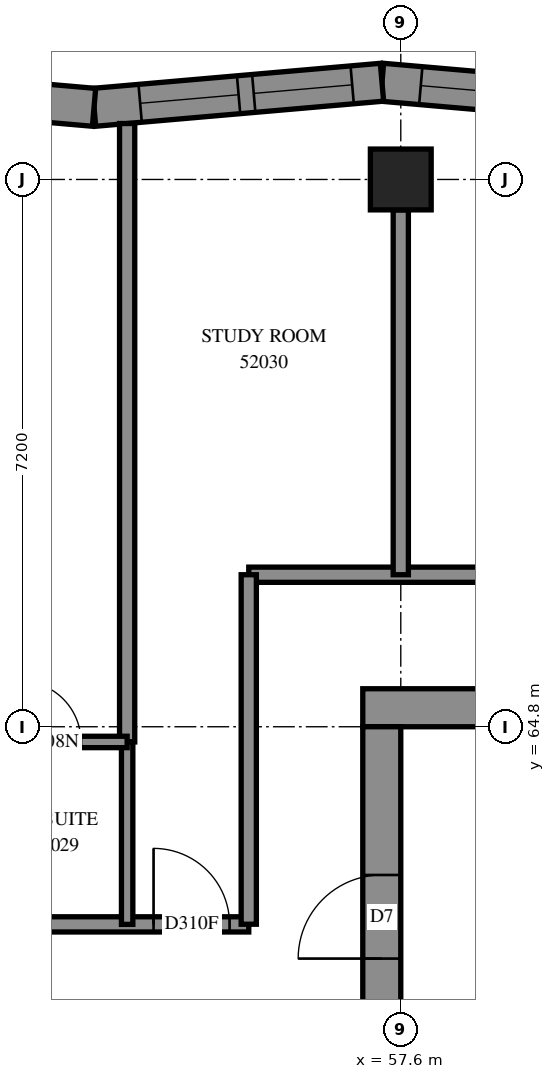
"""IFC4 building model, lengths in metres.
Left out: names, types, materials, properties, quantities, classifications, styles, units other than length and angle.
Written with IfcOpenShell. Run it as: python <this file> out.ifc"""

import sys

from ifc_helpers import new_model, si_unit, direction, frame, frame_2d, origin, origin_2d, place, context, subcontext, project, spatial, polyline, rectangle, outline, extrude, element, fill, save


model = new_model("IFC4")
c1 = context("Model", 3, precision=1e-05, world=origin(), true_north=direction((0.0, 1.0)))
c2 = subcontext(c1, "Body", "Model", "MODEL_VIEW")
j1 = project(units=[si_unit("LENGTHUNIT", "METRE"), si_unit("PLANEANGLEUNIT", "RADIAN")], contexts=[c1])
p1 = place(None, origin())
s1 = spatial("IfcSite", under=j1, at=p1, CompositionType="ELEMENT")
p2 = place(p1, origin())
s2 = spatial("IfcBuilding", under=s1, at=p2, CompositionType="ELEMENT")
p3 = place(p2, frame((0.0, 0.0, 193.0)))
s3 = spatial("IfcBuildingStorey", under=s2, at=p3, CompositionType="ELEMENT", Elevation=193.0)
p4 = place(p3, frame((57.6, 72.0, 0.0), z_axis=(0.0, 0.0, 1.0), x_axis=(1.0, 0.0, 0.0)))
e1 = element("IfcColumn", 1, at=p4, inside=s3, PredefinedType="COLUMN", context=c2, shape_type="SweptSolid", body=[
    extrude(rectangle(XDim=0.8, YDim=0.8, at=origin_2d()), origin(), (0.0, 0.0, 1.0), 3.1),
])
p5 = place(p3, frame((57.1, 65.05, -0.3), z_axis=(0.0, 0.0, 1.0), x_axis=(1.0, 0.0, 0.0)))
e2 = element("IfcWall", 2, at=p5, inside=s3, PredefinedType="SHEAR", context=c2, shape_type="SweptSolid", body=[
    extrude(rectangle(XDim=15.4, YDim=0.5, at=frame_2d((7.7, 0.0))), origin(), (0.0, 0.0, 1.0), 2.7),
])
p6 = place(p5, frame((10.5, 0.0, 0.3)))
e3 = element("IfcOpeningElement", 3, at=p6, cuts=e2, PredefinedType="OPENING", context=c2, shape_type="SweptSolid", body=[
    extrude(rectangle(XDim=0.8, YDim=2.1, at=frame_2d((0.4, 1.05))), frame((0.0, 0.26, 0.0), z_axis=(0.0, -1.0, 0.0), x_axis=(1.0, 0.0, 0.0)), (0.0, 0.0, 1.0), 0.52),
])
p7 = place(p3, frame((57.35, 50.4, -0.3), z_axis=(0.0, 0.0, 1.0), x_axis=(0.0, 1.0, 0.0)))
e4 = element("IfcWall", 4, at=p7, inside=s3, PredefinedType="SHEAR", context=c2, shape_type="SweptSolid", body=[
    extrude(rectangle(XDim=14.4, YDim=0.5, at=frame_2d((7.2, 0.0))), origin(), (0.0, 0.0, 1.0), 2.7),
])
p8 = place(p7, frame((4.55, 0.0, 0.3)))
e5 = element("IfcOpeningElement", 5, at=p8, cuts=e4, PredefinedType="OPENING", context=c2, shape_type="SweptSolid", body=[
    extrude(rectangle(XDim=1.1, YDim=2.1, at=frame_2d((0.55, 1.05))), frame((0.0, 0.26, 0.0), z_axis=(0.0, -1.0, 0.0), x_axis=(1.0, 0.0, 0.0)), (0.0, 0.0, 1.0), 0.52),
])
p9 = place(p7, frame((11.35, 0.0, 0.3)))
e6 = element("IfcOpeningElement", 6, at=p9, cuts=e4, PredefinedType="OPENING", context=c2, shape_type="SweptSolid", body=[
    extrude(rectangle(XDim=1.1, YDim=2.1, at=frame_2d((0.55, 1.05))), frame((0.0, 0.26, 0.0), z_axis=(0.0, -1.0, 0.0), x_axis=(1.0, 0.0, 0.0)), (0.0, 0.0, 1.0), 0.52),
])
p10 = place(p3, frame((61.141, 72.949, 0.0), z_axis=(0.0, 0.0, 1.0), x_axis=(-0.9962273538, 0.0867816769, 0.0)))
e7 = element("IfcWall", 7, at=p10, inside=s3, PredefinedType="SOLIDWALL", context=c2, shape_type="SweptSolid", body=[
    extrude(outline(polyline([(0.022, -0.25), (3.824, -0.25), (3.781, 0.25), (-0.022, 0.25), (0.022, -0.25)])), origin(), (0.0, 0.0, 1.0), 3.1),
])
p11 = place(p10, frame((0.49, 0.0, 0.45)))
e8 = element("IfcOpeningElement", 8, at=p11, cuts=e7, PredefinedType="OPENING", context=c2, shape_type="SweptSolid", body=[
    extrude(rectangle(XDim=1.3, YDim=2.5, at=frame_2d((0.65, 1.25))), frame((0.0, 0.26, 0.0), z_axis=(0.0, -1.0, 0.0), x_axis=(1.0, 0.0, 0.0)), (0.0, 0.0, 1.0), 0.52),
])
p12 = place(p10, frame((1.99, 0.0, 0.45)))
e9 = element("IfcOpeningElement", 9, at=p12, cuts=e7, PredefinedType="OPENING", context=c2, shape_type="SweptSolid", body=[
    extrude(rectangle(XDim=1.3, YDim=2.5, at=frame_2d((0.65, 1.25))), frame((0.0, 0.26, 0.0), z_axis=(0.0, -1.0, 0.0), x_axis=(1.0, 0.0, 0.0)), (0.0, 0.0, 1.0), 0.52),
])
p13 = place(p3, frame((57.353, 73.279, 0.0), z_axis=(0.0, 0.0, 1.0), x_axis=(-0.9962273538, -0.0867816769, 0.0)))
e10 = element("IfcWall", 10, at=p13, inside=s3, PredefinedType="SOLIDWALL", context=c2, shape_type="SweptSolid", body=[
    extrude(outline(polyline([(-0.022, -0.25), (3.781, -0.25), (3.824, 0.25), (0.022, 0.25), (-0.022, -0.25)])), origin(), (0.0, 0.0, 1.0), 3.1),
])
p14 = place(p13, frame((0.394, 0.0, 0.45)))
e11 = element("IfcOpeningElement", 11, at=p14, cuts=e10, PredefinedType="OPENING", context=c2, shape_type="SweptSolid", body=[
    extrude(rectangle(XDim=1.3, YDim=2.5, at=frame_2d((0.65, 1.25))), frame((0.0, 0.26, 0.0), z_axis=(0.0, -1.0, 0.0), x_axis=(1.0, 0.0, 0.0)), (0.0, 0.0, 1.0), 0.52),
])
p15 = place(p13, frame((1.894, 0.0, 0.45)))
e12 = element("IfcOpeningElement", 12, at=p15, cuts=e10, PredefinedType="OPENING", context=c2, shape_type="SweptSolid", body=[
    extrude(rectangle(XDim=1.3, YDim=2.5, at=frame_2d((0.65, 1.25))), frame((0.0, 0.26, 0.0), z_axis=(0.0, -1.0, 0.0), x_axis=(1.0, 0.0, 0.0)), (0.0, 0.0, 1.0), 0.52),
])
p16 = place(p3, frame((53.564, 72.949, 0.0), z_axis=(0.0, 0.0, 1.0), x_axis=(-0.9962271558, 0.0867839505, 0.0)))
e13 = element("IfcWall", 13, at=p16, inside=s3, PredefinedType="SOLIDWALL", context=c2, shape_type="SweptSolid", body=[
    extrude(outline(polyline([(0.022, -0.25), (3.824, -0.25), (3.781, 0.25), (-0.022, 0.25), (0.022, -0.25)])), origin(), (0.0, 0.0, 1.0), 3.1),
])
p17 = place(p16, frame((1.088, 0.0, 0.45)))
e14 = element("IfcOpeningElement", 14, at=p17, cuts=e13, PredefinedType="OPENING", context=c2, shape_type="SweptSolid", body=[
    extrude(rectangle(XDim=1.2, YDim=2.5, at=frame_2d((0.6, 1.25))), frame((0.0, 0.26, 0.0), z_axis=(0.0, -1.0, 0.0), x_axis=(1.0, 0.0, 0.0)), (0.0, 0.0, 1.0), 0.52),
])
p18 = place(p3, frame((55.6, 66.8, 0.0), z_axis=(0.0, 0.0, 1.0), x_axis=(1.0, 0.0, 0.0)))
e15 = element("IfcWall", 15, at=p18, inside=s3, PredefinedType="PARTITIONING", context=c2, shape_type="SweptSolid", body=[
    extrude(rectangle(XDim=18.4, YDim=0.2, at=frame_2d((9.2, 0.0))), origin(), (0.0, 0.0, 1.0), 3.1),
])
p19 = place(p18, frame((5.886, 0.0, 0.0)))
e16 = element("IfcOpeningElement", 16, at=p19, cuts=e15, PredefinedType="OPENING", context=c2, shape_type="SweptSolid", body=[
    extrude(rectangle(XDim=1.0, YDim=2.1, at=frame_2d((0.5, 1.05))), frame((0.0, 0.11, 0.0), z_axis=(0.0, -1.0, 0.0), x_axis=(1.0, 0.0, 0.0)), (0.0, 0.0, 1.0), 0.22),
])
p20 = place(p18, frame((13.389, 0.0, 0.0)))
e17 = element("IfcOpeningElement", 17, at=p20, cuts=e15, PredefinedType="OPENING", context=c2, shape_type="SweptSolid", body=[
    extrude(rectangle(XDim=1.0, YDim=2.1, at=frame_2d((0.5, 1.05))), frame((0.0, 0.11, 0.0), z_axis=(0.0, -1.0, 0.0), x_axis=(1.0, 0.0, 0.0)), (0.0, 0.0, 1.0), 0.22),
])
p21 = place(p3, frame((40.602, 62.2, 0.0), z_axis=(0.0, 0.0, 1.0), x_axis=(1.0, 0.0, 0.0)))
e18 = element("IfcWall", 18, at=p21, inside=s3, PredefinedType="PARTITIONING", context=c2, shape_type="SweptSolid", body=[
    extrude(rectangle(XDim=14.998, YDim=0.2, at=frame_2d((7.499, 0.0))), origin(), (0.0, 0.0, 1.0), 3.1),
])
p22 = place(p21, frame((1.306, 0.0, 0.0)))
e19 = element("IfcOpeningElement", 19, at=p22, cuts=e18, PredefinedType="OPENING", context=c2, shape_type="SweptSolid", body=[
    extrude(rectangle(XDim=0.9, YDim=2.1, at=frame_2d((0.45, 1.05))), frame((0.0, 0.11, 0.0), z_axis=(0.0, -1.0, 0.0), x_axis=(1.0, 0.0, 0.0)), (0.0, 0.0, 1.0), 0.22),
])
p23 = place(p21, frame((8.548, 0.0, 0.0)))
e20 = element("IfcOpeningElement", 20, at=p23, cuts=e18, PredefinedType="OPENING", context=c2, shape_type="SweptSolid", body=[
    extrude(rectangle(XDim=0.9, YDim=2.1, at=frame_2d((0.45, 1.05))), frame((0.0, 0.11, 0.0), z_axis=(0.0, -1.0, 0.0), x_axis=(1.0, 0.0, 0.0)), (0.0, 0.0, 1.0), 0.22),
])
p24 = place(p21, frame((10.198, 0.0, 0.0)))
e21 = element("IfcOpeningElement", 21, at=p24, cuts=e18, PredefinedType="OPENING", context=c2, shape_type="SweptSolid", body=[
    extrude(rectangle(XDim=0.9, YDim=2.1, at=frame_2d((0.45, 1.05))), frame((0.0, 0.11, 0.0), z_axis=(0.0, -1.0, 0.0), x_axis=(1.0, 0.0, 0.0)), (0.0, 0.0, 1.0), 0.22),
])
p25 = place(p21, frame((13.746, 0.0, 0.0)))
e22 = element("IfcOpeningElement", 22, at=p25, cuts=e18, PredefinedType="OPENING", context=c2, shape_type="SweptSolid", body=[
    extrude(rectangle(XDim=1.0, YDim=2.1, at=frame_2d((0.5, 1.05))), frame((0.0, 0.11, 0.0), z_axis=(0.0, -1.0, 0.0), x_axis=(1.0, 0.0, 0.0)), (0.0, 0.0, 1.0), 0.22),
])
p26 = place(p3, frame((54.0, 64.6, 0.0), z_axis=(0.0, 0.0, 1.0), x_axis=(0.0, 1.0, 0.0)))
e23 = element("IfcWall", 23, at=p26, inside=s3, PredefinedType="PARTITIONING", context=c2, shape_type="SweptSolid", body=[
    extrude(rectangle(XDim=8.136, YDim=0.2, at=frame_2d((4.068, 0.0))), origin(), (0.0, 0.0, 1.0), 3.1),
])
p27 = place(p3, frame((57.6, 66.8, 0.0), z_axis=(0.0, 0.0, 1.0), x_axis=(0.0, 1.0, 0.0)))
e24 = element("IfcWall", 24, at=p27, inside=s3, PredefinedType="PARTITIONING", context=c2, shape_type="SweptSolid", body=[
    extrude(rectangle(XDim=4.8, YDim=0.2, at=frame_2d((2.4, 0.0))), origin(), (0.0, 0.0, 1.0), 3.1),
])
p28 = place(p3, frame((55.6, 62.202, 0.0), z_axis=(0.0, 0.0, 1.0), x_axis=(0.0, 1.0, 0.0)))
e25 = element("IfcWall", 25, at=p28, inside=s3, PredefinedType="PARTITIONING", context=c2, shape_type="SweptSolid", body=[
    extrude(rectangle(XDim=4.598, YDim=0.2, at=frame_2d((2.299, 0.0))), origin(), (0.0, 0.0, 1.0), 3.1),
])
p29 = place(p3, frame((54.0, 62.2, 0.0), z_axis=(0.0, 0.0, 1.0), x_axis=(0.0, 1.0, 0.0)))
e26 = element("IfcWall", 26, at=p29, inside=s3, PredefinedType="PARTITIONING", context=c2, shape_type="SweptSolid", body=[
    extrude(rectangle(XDim=2.4, YDim=0.15, at=frame_2d((1.2, 0.0))), origin(), (0.0, 0.0, 1.0), 3.1),
])
p30 = place(p3, frame((52.1, 64.6, 0.0), z_axis=(0.0, 0.0, 1.0), x_axis=(1.0, 0.0, 0.0)))
e27 = element("IfcWall", 27, at=p30, inside=s3, PredefinedType="PARTITIONING", context=c2, shape_type="SweptSolid", body=[
    extrude(rectangle(XDim=1.9, YDim=0.15, at=frame_2d((0.95, 0.0))), origin(), (0.0, 0.0, 1.0), 3.1),
])
p31 = place(p30, frame((0.493, 0.0, 0.0)))
e28 = element("IfcOpeningElement", 28, at=p31, cuts=e27, PredefinedType="OPENING", context=c2, shape_type="SweptSolid", body=[
    extrude(rectangle(XDim=0.8, YDim=2.1, at=frame_2d((0.4, 1.05))), frame((0.0, 0.085, 0.0), z_axis=(0.0, -1.0, 0.0), x_axis=(1.0, 0.0, 0.0)), (0.0, 0.0, 1.0), 0.17),
])
p32 = place(p12, origin())
e29 = element("IfcWindow", 29, at=p32, inside=s3, PartitioningType="SINGLE_PANEL", PredefinedType="WINDOW", context=c2, shape_type="SweptSolid", body=[
    extrude(rectangle(XDim=1.3, YDim=2.5, at=frame_2d((0.65, 1.25))), frame((0.0, 0.18, 0.0), z_axis=(0.0, -1.0, 0.0), x_axis=(1.0, 0.0, 0.0)), (0.0, 0.0, 1.0), 0.06),
])
fill(e9, e29)
p33 = place(p14, origin())
e30 = element("IfcWindow", 30, at=p33, inside=s3, PartitioningType="SINGLE_PANEL", PredefinedType="WINDOW", context=c2, shape_type="SweptSolid", body=[
    extrude(rectangle(XDim=1.3, YDim=2.5, at=frame_2d((0.65, 1.25))), frame((0.0, 0.18, 0.0), z_axis=(0.0, -1.0, 0.0), x_axis=(1.0, 0.0, 0.0)), (0.0, 0.0, 1.0), 0.06),
])
fill(e11, e30)
p34 = place(p15, origin())
e31 = element("IfcWindow", 31, at=p34, inside=s3, PartitioningType="SINGLE_PANEL", PredefinedType="WINDOW", context=c2, shape_type="SweptSolid", body=[
    extrude(rectangle(XDim=1.3, YDim=2.5, at=frame_2d((0.65, 1.25))), frame((0.0, 0.18, 0.0), z_axis=(0.0, -1.0, 0.0), x_axis=(1.0, 0.0, 0.0)), (0.0, 0.0, 1.0), 0.06),
])
fill(e12, e31)
p35 = place(p9, origin())
e32 = element("IfcDoor", 32, at=p35, inside=s3, OperationType="SINGLE_SWING_LEFT", PredefinedType="DOOR", context=c2, shape_type="SweptSolid", body=[
    extrude(rectangle(XDim=1.1, YDim=2.1, at=frame_2d((0.55, 1.05))), frame((0.0, 0.025, 0.0), z_axis=(0.0, -1.0, 0.0), x_axis=(1.0, 0.0, 0.0)), (0.0, 0.0, 1.0), 0.05),
])
fill(e6, e32)
p36 = place(p31, origin())
e33 = element("IfcDoor", 33, at=p36, inside=s3, OperationType="SINGLE_SWING_RIGHT", PredefinedType="DOOR", context=c2, shape_type="SweptSolid", body=[
    extrude(rectangle(XDim=0.8, YDim=2.1, at=frame_2d((0.4, 1.05))), frame((0.0, 0.025, 0.0), z_axis=(0.0, -1.0, 0.0), x_axis=(1.0, 0.0, 0.0)), (0.0, 0.0, 1.0), 0.05),
])
fill(e28, e33)
p37 = place(p25, origin())
e34 = element("IfcDoor", 34, at=p37, inside=s3, OperationType="SINGLE_SWING_LEFT", PredefinedType="DOOR", context=c2, shape_type="SweptSolid", body=[
    extrude(rectangle(XDim=1.0, YDim=2.1, at=frame_2d((0.5, 1.05))), frame((0.0, 0.025, 0.0), z_axis=(0.0, -1.0, 0.0), x_axis=(1.0, 0.0, 0.0)), (0.0, 0.0, 1.0), 0.05),
])
fill(e22, e34)
save(model, sys.argv[1])
